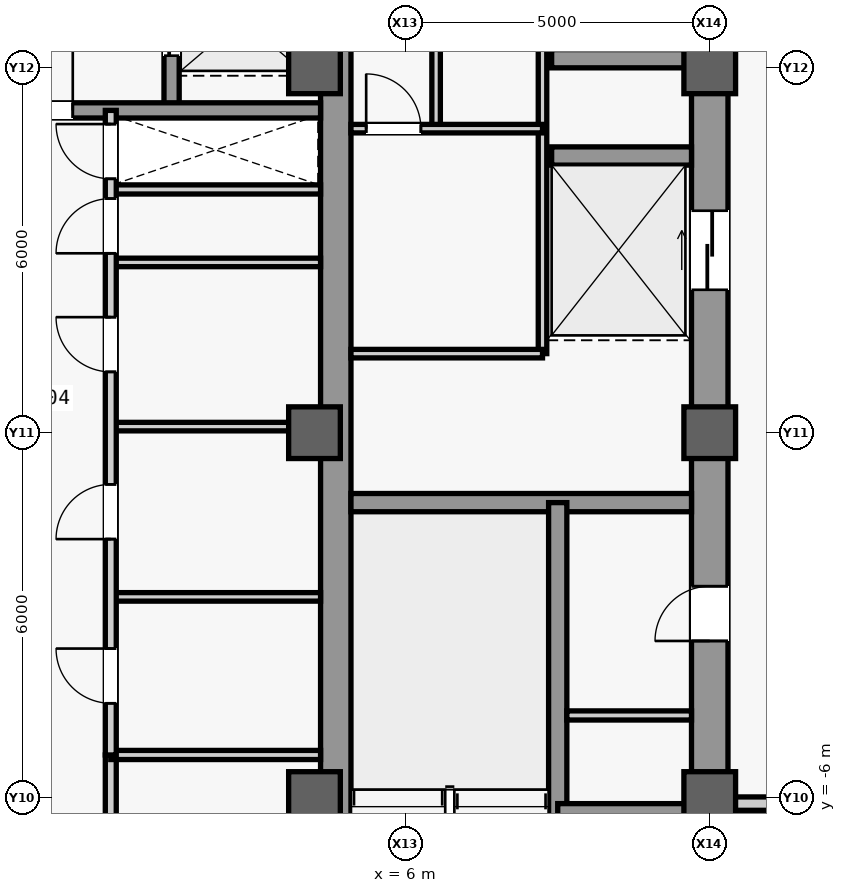
"""IFC4 building model, lengths in metres.
Left out: names, types, materials, properties, quantities, classifications, styles, units other than length and angle.
Written with IfcOpenShell. Run it as: python <this file> out.ifc"""

import sys

from ifc_helpers import new_model, si_unit, direction, frame, frame_2d, origin, origin_2d, place, context, subcontext, project, spatial, rectangle, extrude, source, transform, mapped, element, fill, save


model = new_model("IFC4")
c1 = context("Model", 3, precision=1e-05, world=origin(), true_north=direction((0.0, 1.0)))
c2 = subcontext(c1, "Body", "Model", "MODEL_VIEW")
j1 = project(units=[si_unit("LENGTHUNIT", "METRE"), si_unit("PLANEANGLEUNIT", "RADIAN")], contexts=[c1])
p1 = place(None, origin())
s1 = spatial("IfcSite", under=j1, at=p1, CompositionType="ELEMENT")
p2 = place(p1, origin())
s2 = spatial("IfcBuilding", under=s1, at=p2, CompositionType="ELEMENT")
p3 = place(p2, frame((0.0, 0.0, 207.1)))
s3 = spatial("IfcBuildingStorey", under=s2, at=p3, CompositionType="ELEMENT", Elevation=207.1)
m1 = source(origin(), c2, "Body", "SweptSolid", [
    extrude(rectangle(XDim=22.0, YDim=0.6, at=frame_2d((11.0, 0.0))), origin(), (0.0, 0.0, 1.0), 3.78),
])
p4 = place(p3, frame((11.0, -11.0, 0.0), z_axis=(0.0, 0.0, 1.0), x_axis=(0.0, 1.0, 0.0)))
e1 = element("IfcWall", 1, at=p4, inside=s3, PredefinedType="SHEAR", context=c2, shape_type="MappedRepresentation", body=[
    mapped(m1, transform((0.0, 0.0, 0.0), scale=1.0)),
])
m2 = source(origin(), c2, "Body", "SweptSolid", [
    extrude(rectangle(XDim=1.1, YDim=2.2, at=frame_2d((0.55, 1.1))), frame((0.0, 0.31, 0.0), z_axis=(0.0, -1.0, 0.0), x_axis=(1.0, 0.0, 0.0)), (0.0, 0.0, 1.0), 0.62),
])
p5 = place(p4, frame((0.8, 0.0, 0.0)))
e2 = element("IfcOpeningElement", 2, at=p5, cuts=e1, PredefinedType="OPENING", context=c2, shape_type="MappedRepresentation", body=[
    mapped(m2, transform((0.0, 0.0, 0.0), scale=1.0)),
])
m3 = source(origin(), c2, "Body", "SweptSolid", [
    extrude(rectangle(XDim=0.9, YDim=2.15, at=frame_2d((0.45, 1.075))), frame((0.0, 0.31, 0.0), z_axis=(0.0, -1.0, 0.0), x_axis=(1.0, 0.0, 0.0)), (0.0, 0.0, 1.0), 0.62),
])
p6 = place(p4, frame((7.575, 0.0, 0.0)))
e3 = element("IfcOpeningElement", 3, at=p6, cuts=e1, PredefinedType="OPENING", context=c2, shape_type="MappedRepresentation", body=[
    mapped(m3, transform((0.0, 0.0, 0.0), scale=1.0)),
])
m4 = source(origin(), c2, "Body", "SweptSolid", [
    extrude(rectangle(XDim=1.3, YDim=2.3, at=frame_2d((0.65, 1.15))), frame((0.0, 0.31, 0.0), z_axis=(0.0, -1.0, 0.0), x_axis=(1.0, 0.0, 0.0)), (0.0, 0.0, 1.0), 0.62),
])
p7 = place(p4, frame((2.7, 0.0, 0.0)))
e4 = element("IfcOpeningElement", 4, at=p7, cuts=e1, PredefinedType="OPENING", context=c2, shape_type="MappedRepresentation", body=[
    mapped(m4, transform((0.0, 0.0, 0.0), scale=1.0)),
])
p8 = place(p4, frame((13.35, 0.0, 0.0)))
e5 = element("IfcOpeningElement", 5, at=p8, cuts=e1, PredefinedType="OPENING", context=c2, shape_type="MappedRepresentation", body=[
    mapped(m4, transform((0.0, 0.0, 0.0), scale=1.0)),
])
m5 = source(origin(), c2, "Body", "SweptSolid", [
    extrude(rectangle(XDim=21.4, YDim=0.5, at=frame_2d((10.7, 0.0))), origin(), (0.0, 0.0, 1.0), 3.78),
])
p9 = place(p3, frame((4.85, -10.7, 0.0), z_axis=(0.0, 0.0, 1.0), x_axis=(0.0, 1.0, 0.0)))
e6 = element("IfcWall", 6, at=p9, inside=s3, PredefinedType="SHEAR", context=c2, shape_type="MappedRepresentation", body=[
    mapped(m5, transform((0.0, 0.0, 0.0), scale=1.0)),
])
m6 = source(origin(), c2, "Body", "SweptSolid", [
    extrude(rectangle(XDim=5.6, YDim=0.3, at=frame_2d((2.8, 0.0))), origin(), (0.0, 0.0, 1.0), 3.78),
])
p10 = place(p3, frame((5.1, -1.15, 0.0), z_axis=(0.0, 0.0, 1.0), x_axis=(1.0, 0.0, 0.0)))
e7 = element("IfcWall", 7, at=p10, inside=s3, PredefinedType="SHEAR", context=c2, shape_type="MappedRepresentation", body=[
    mapped(m6, transform((0.0, 0.0, 0.0), scale=1.0)),
])
m7 = source(origin(), c2, "Body", "SweptSolid", [
    extrude(rectangle(XDim=0.85, YDim=0.85, at=origin_2d()), origin(), (0.0, 0.0, 1.0), 4.0),
])
for number, where, z_axis, x_axis in (
    (8, (4.5, -6.0, 0.0), (0.0, 0.0, 1.0), (1.0, 0.0, 0.0)),
    (9, (4.5, 0.0, 0.0), (0.0, 0.0, 1.0), (1.0, 0.0, 0.0)),
    (10, (4.5, 6.0, 0.0), (0.0, 0.0, 1.0), (1.0, 0.0, 0.0)),
    (11, (11.0, -6.0, 0.0), (0.0, 0.0, 1.0), (1.0, 0.0, 0.0)),
    (12, (11.0, 0.0, 0.0), (0.0, 0.0, 1.0), (1.0, 0.0, 0.0)),
    (13, (11.0, 6.0, 0.0), (0.0, 0.0, 1.0), (1.0, 0.0, 0.0)),
):
    element("IfcColumn", number, at=place(p3, frame(where, z_axis=z_axis, x_axis=x_axis)), inside=s3, PredefinedType="COLUMN", context=c2, shape_type="MappedRepresentation", body=[
        mapped(m7, transform((0.0, 0.0, 0.0), scale=1.0)),
    ])
m8 = source(origin(), c2, "Body", "SweptSolid", [
    extrude(rectangle(XDim=7.8, YDim=0.3, at=frame_2d((3.9, 0.0))), origin(), (0.0, 0.0, 1.0), 3.78),
])
p11 = place(p3, frame((8.5, -8.95, 0.0), z_axis=(0.0, 0.0, 1.0), x_axis=(0.0, 1.0, 0.0)))
e14 = element("IfcWall", 14, at=p11, inside=s3, PredefinedType="SHEAR", context=c2, shape_type="MappedRepresentation", body=[
    mapped(m8, transform((0.0, 0.0, 0.0), scale=1.0)),
])
m9 = source(origin(), c2, "Body", "SweptSolid", [
    extrude(rectangle(XDim=2.2, YDim=0.3, at=frame_2d((1.1, 0.0))), origin(), (0.0, 0.0, 1.0), 3.78),
])
p12 = place(p3, frame((8.5, -6.25, 0.0), z_axis=(0.0, 0.0, 1.0), x_axis=(1.0, 0.0, 0.0)))
e15 = element("IfcWall", 15, at=p12, inside=s3, PredefinedType="SHEAR", context=c2, shape_type="MappedRepresentation", body=[
    mapped(m9, transform((0.0, 0.0, 0.0), scale=1.0)),
])
m10 = source(origin(), c2, "Body", "SweptSolid", [
    extrude(rectangle(XDim=2.3, YDim=0.3, at=frame_2d((1.15, 0.0))), origin(), (0.0, 0.0, 1.0), 3.78),
])
for number, where, z_axis, x_axis in (
    (16, (8.4, 4.55, 0.0), (0.0, 0.0, 1.0), (1.0, 0.0, 0.0)),
    (17, (8.4, 6.15, 0.0), (0.0, 0.0, 1.0), (1.0, 0.0, 0.0)),
):
    element("IfcWall", number, at=place(p3, frame(where, z_axis=z_axis, x_axis=x_axis)), inside=s3, PredefinedType="SHEAR", context=c2, shape_type="MappedRepresentation", body=[
        mapped(m10, transform((0.0, 0.0, 0.0), scale=1.0)),
    ])
m11 = source(origin(), c2, "Body", "SweptSolid", [
    extrude(rectangle(XDim=2.05, YDim=0.15, at=frame_2d((1.025, 0.0))), origin(), (0.0, 0.0, 1.0), 3.78),
])
p13 = place(p3, frame((8.65, -4.65, 0.0), z_axis=(0.0, 0.0, 1.0), x_axis=(1.0, 0.0, 0.0)))
e18 = element("IfcWall", 18, at=p13, inside=s3, PredefinedType="PARTITIONING", context=c2, shape_type="MappedRepresentation", body=[
    mapped(m11, transform((0.0, 0.0, 0.0), scale=1.0)),
])
m12 = source(origin(), c2, "Body", "SweptSolid", [
    extrude(rectangle(XDim=9.4, YDim=0.14, at=frame_2d((4.7, 0.0))), origin(), (0.0, 0.0, 1.0), 3.78),
])
p14 = place(p3, frame((8.25, 1.3, 0.0), z_axis=(0.0, 0.0, 1.0), x_axis=(0.0, 1.0, 0.0)))
e19 = element("IfcWall", 19, at=p14, inside=s3, PredefinedType="PARTITIONING", context=c2, shape_type="MappedRepresentation", body=[
    mapped(m12, transform((0.0, 0.0, 0.0), scale=1.0)),
])
m13 = source(origin(), c2, "Body", "SweptSolid", [
    extrude(rectangle(XDim=3.15, YDim=0.14, at=frame_2d((1.575, 0.0))), origin(), (0.0, 0.0, 1.0), 3.78),
])
p15 = place(p3, frame((5.1, 1.3, 0.0), z_axis=(0.0, 0.0, 1.0), x_axis=(1.0, 0.0, 0.0)))
e20 = element("IfcWall", 20, at=p15, inside=s3, PredefinedType="PARTITIONING", context=c2, shape_type="MappedRepresentation", body=[
    mapped(m13, transform((0.0, 0.0, 0.0), scale=1.0)),
])
m14 = source(origin(), c2, "Body", "SweptSolid", [
    extrude(rectangle(XDim=5.7, YDim=0.14, at=frame_2d((2.85, 0.0))), origin(), (0.0, 0.0, 1.0), 3.78),
])
p16 = place(p3, frame((6.5, 5.0, 0.0), z_axis=(0.0, 0.0, 1.0), x_axis=(0.0, 1.0, 0.0)))
e21 = element("IfcWall", 21, at=p16, inside=s3, PredefinedType="PARTITIONING", context=c2, shape_type="MappedRepresentation", body=[
    mapped(m14, transform((0.0, 0.0, 0.0), scale=1.0)),
])
m15 = source(origin(), c2, "Body", "SweptSolid", [
    extrude(rectangle(XDim=0.9, YDim=2.15, at=frame_2d((0.45, 1.075))), frame((0.0, 0.08, 0.0), z_axis=(0.0, -1.0, 0.0), x_axis=(1.0, 0.0, 0.0)), (0.0, 0.0, 1.0), 0.16),
])
p17 = place(p16, frame((2.05, 0.0, 0.0)))
e22 = element("IfcOpeningElement", 22, at=p17, cuts=e21, PredefinedType="OPENING", context=c2, shape_type="MappedRepresentation", body=[
    mapped(m15, transform((0.0, 0.0, 0.0), scale=1.0)),
])
p18 = place(p3, frame((5.1, 5.0, 0.0), z_axis=(0.0, 0.0, 1.0), x_axis=(1.0, 0.0, 0.0)))
e23 = element("IfcWall", 23, at=p18, inside=s3, PredefinedType="PARTITIONING", context=c2, shape_type="MappedRepresentation", body=[
    mapped(m13, transform((0.0, 0.0, 0.0), scale=1.0)),
])
p19 = place(p18, frame((0.25, 0.0, 0.0)))
e24 = element("IfcOpeningElement", 24, at=p19, cuts=e23, PredefinedType="OPENING", context=c2, shape_type="MappedRepresentation", body=[
    mapped(m15, transform((0.0, 0.0, 0.0), scale=1.0)),
])
m16 = source(origin(), c2, "Body", "SweptSolid", [
    extrude(rectangle(XDim=4.05, YDim=0.22, at=frame_2d((2.025, 0.0))), origin(), (0.0, 0.0, 1.0), 2.38),
])
p20 = place(p3, frame((11.3, -6.1, 0.0), z_axis=(0.0, 0.0, 1.0), x_axis=(1.0, 0.0, 0.0)))
e25 = element("IfcWall", 25, at=p20, inside=s3, PredefinedType="PARTITIONING", context=c2, shape_type="MappedRepresentation", body=[
    mapped(m16, transform((0.0, 0.0, 0.0), scale=1.0)),
])
m17 = source(origin(), c2, "Body", "SweptSolid", [
    extrude(rectangle(XDim=3.45, YDim=0.15, at=frame_2d((1.725, 0.0))), origin(), (0.0, 0.0, 1.0), 3.78),
])
p21 = place(p3, frame((1.15, 4.0, 0.0), z_axis=(0.0, 0.0, 1.0), x_axis=(1.0, 0.0, 0.0)))
e26 = element("IfcWall", 26, at=p21, inside=s3, PredefinedType="PARTITIONING", context=c2, shape_type="MappedRepresentation", body=[
    mapped(m17, transform((0.0, 0.0, 0.0), scale=1.0)),
])
m18 = source(origin(), c2, "Body", "SweptSolid", [
    extrude(rectangle(XDim=5.4, YDim=0.18, at=frame_2d((2.7, 0.0))), origin(), (0.0, 0.0, 1.0), 3.78),
])
p22 = place(p3, frame((1.15, -10.7, 0.0), z_axis=(0.0, 0.0, 1.0), x_axis=(0.0, 1.0, 0.0)))
e27 = element("IfcWall", 27, at=p22, inside=s3, PredefinedType="PARTITIONING", context=c2, shape_type="MappedRepresentation", body=[
    mapped(m18, transform((0.0, 0.0, 0.0), scale=1.0)),
])
m19 = source(origin(), c2, "Body", "SweptSolid", [
    extrude(rectangle(XDim=0.9, YDim=2.15, at=frame_2d((0.45, 1.075))), frame((0.0, 0.1, 0.0), z_axis=(0.0, -1.0, 0.0), x_axis=(1.0, 0.0, 0.0)), (0.0, 0.0, 1.0), 0.2),
])
p23 = place(p22, frame((2.25, 0.0, 0.0)))
e28 = element("IfcOpeningElement", 28, at=p23, cuts=e27, PredefinedType="OPENING", context=c2, shape_type="MappedRepresentation", body=[
    mapped(m19, transform((0.0, 0.0, 0.0), scale=1.0)),
])
p24 = place(p3, frame((1.15, -5.3, 0.0), z_axis=(0.0, 0.0, 1.0), x_axis=(1.0, 0.0, 0.0)))
e29 = element("IfcWall", 29, at=p24, inside=s3, PredefinedType="PARTITIONING", context=c2, shape_type="MappedRepresentation", body=[
    mapped(m17, transform((0.0, 0.0, 0.0), scale=1.0)),
])
m20 = source(origin(), c2, "Body", "SweptSolid", [
    extrude(rectangle(XDim=5.4, YDim=0.25, at=frame_2d((2.7, 0.0))), origin(), (0.0, 0.0, 1.0), 3.78),
])
p25 = place(p3, frame((2.15, 5.3, 0.0), z_axis=(0.0, 0.0, 1.0), x_axis=(0.0, 1.0, 0.0)))
e30 = element("IfcWall", 30, at=p25, inside=s3, PredefinedType="SHEAR", context=c2, shape_type="MappedRepresentation", body=[
    mapped(m20, transform((0.0, 0.0, 0.0), scale=1.0)),
])
m21 = source(origin(), c2, "Body", "SweptSolid", [
    extrude(rectangle(XDim=1.2, YDim=2.3, at=frame_2d((0.6, 1.15))), frame((0.0, 0.135, 0.0), z_axis=(0.0, -1.0, 0.0), x_axis=(1.0, 0.0, 0.0)), (0.0, 0.0, 1.0), 0.27),
])
p26 = place(p25, frame((3.3, 0.0, 0.0)))
e31 = element("IfcOpeningElement", 31, at=p26, cuts=e30, PredefinedType="OPENING", context=c2, shape_type="MappedRepresentation", body=[
    mapped(m21, transform((0.0, 0.0, 0.0), scale=1.0)),
])
p27 = place(p25, frame((0.9, 0.0, 0.0)))
e32 = element("IfcOpeningElement", 32, at=p27, cuts=e30, PredefinedType="OPENING", context=c2, shape_type="MappedRepresentation", body=[
    mapped(m21, transform((0.0, 0.0, 0.0), scale=1.0)),
])
m22 = source(origin(), c2, "Body", "SweptSolid", [
    extrude(rectangle(XDim=9.2, YDim=0.25, at=frame_2d((4.6, 0.0))), origin(), (0.0, 0.0, 1.0), 3.78),
])
p28 = place(p3, frame((-4.6, 5.3, 0.0), z_axis=(0.0, 0.0, 1.0), x_axis=(1.0, 0.0, 0.0)))
e33 = element("IfcWall", 33, at=p28, inside=s3, PredefinedType="SHEAR", context=c2, shape_type="MappedRepresentation", body=[
    mapped(m22, transform((0.0, 0.0, 0.0), scale=1.0)),
])
m23 = source(origin(), c2, "Body", "SweptSolid", [
    extrude(rectangle(XDim=1.05, YDim=2.2, at=frame_2d((0.525, 1.1))), frame((0.0, 0.135, 0.0), z_axis=(0.0, -1.0, 0.0), x_axis=(1.0, 0.0, 0.0)), (0.0, 0.0, 1.0), 0.27),
])
p29 = place(p28, frame((4.075, 0.0, 0.0)))
e34 = element("IfcOpeningElement", 34, at=p29, cuts=e33, PredefinedType="OPENING", context=c2, shape_type="MappedRepresentation", body=[
    mapped(m23, transform((0.0, 0.0, 0.0), scale=1.0)),
])
m24 = source(origin(), c2, "Body", "SweptSolid", [
    extrude(rectangle(XDim=3.45, YDim=0.14, at=frame_2d((1.725, 0.0))), origin(), (0.0, 0.0, 1.0), 3.78),
])
p30 = place(p3, frame((1.15, -2.7, 0.0), z_axis=(0.0, 0.0, 1.0), x_axis=(1.0, 0.0, 0.0)))
e35 = element("IfcWall", 35, at=p30, inside=s3, PredefinedType="PARTITIONING", context=c2, shape_type="MappedRepresentation", body=[
    mapped(m24, transform((0.0, 0.0, 0.0), scale=1.0)),
])
m25 = source(origin(), c2, "Body", "SweptSolid", [
    extrude(rectangle(XDim=3.45, YDim=0.14, at=frame_2d((1.725, 0.0))), origin(), (0.0, 0.0, 1.0), 3.085),
])
p31 = place(p3, frame((1.15, 0.1, 0.0), z_axis=(0.0, 0.0, 1.0), x_axis=(1.0, 0.0, 0.0)))
e36 = element("IfcWall", 36, at=p31, inside=s3, PredefinedType="PARTITIONING", context=c2, shape_type="MappedRepresentation", body=[
    mapped(m25, transform((0.0, 0.0, 0.0), scale=1.0)),
])
p32 = place(p3, frame((1.15, 2.8, 0.0), z_axis=(0.0, 0.0, 1.0), x_axis=(1.0, 0.0, 0.0)))
e37 = element("IfcWall", 37, at=p32, inside=s3, PredefinedType="PARTITIONING", context=c2, shape_type="MappedRepresentation", body=[
    mapped(m24, transform((0.0, 0.0, 0.0), scale=1.0)),
])
m26 = source(origin(), c2, "Body", "SweptSolid", [
    extrude(rectangle(XDim=10.6, YDim=0.18, at=frame_2d((5.3, 0.0))), origin(), (0.0, 0.0, 1.0), 3.78),
])
p33 = place(p3, frame((1.15, -5.3, 0.0), z_axis=(0.0, 0.0, 1.0), x_axis=(0.0, 1.0, 0.0)))
e38 = element("IfcWall", 38, at=p33, inside=s3, PredefinedType="PARTITIONING", context=c2, shape_type="MappedRepresentation", body=[
    mapped(m26, transform((0.0, 0.0, 0.0), scale=1.0)),
])
p34 = place(p33, frame((0.85, 0.0, 0.0)))
e39 = element("IfcOpeningElement", 39, at=p34, cuts=e38, PredefinedType="OPENING", context=c2, shape_type="MappedRepresentation", body=[
    mapped(m19, transform((0.0, 0.0, 0.0), scale=1.0)),
])
p35 = place(p33, frame((3.55, 0.0, 0.0)))
e40 = element("IfcOpeningElement", 40, at=p35, cuts=e38, PredefinedType="OPENING", context=c2, shape_type="MappedRepresentation", body=[
    mapped(m19, transform((0.0, 0.0, 0.0), scale=1.0)),
])
p36 = place(p33, frame((6.3, 0.0, 0.0)))
e41 = element("IfcOpeningElement", 41, at=p36, cuts=e38, PredefinedType="OPENING", context=c2, shape_type="MappedRepresentation", body=[
    mapped(m19, transform((0.0, 0.0, 0.0), scale=1.0)),
])
p37 = place(p33, frame((8.25, 0.0, 0.0)))
e42 = element("IfcOpeningElement", 42, at=p37, cuts=e38, PredefinedType="OPENING", context=c2, shape_type="MappedRepresentation", body=[
    mapped(m19, transform((0.0, 0.0, 0.0), scale=1.0)),
])
p38 = place(p33, frame((9.475, 0.0, 0.0)))
e43 = element("IfcOpeningElement", 43, at=p38, cuts=e38, PredefinedType="OPENING", context=c2, shape_type="MappedRepresentation", body=[
    mapped(m19, transform((0.0, 0.0, 0.0), scale=1.0)),
])
m27 = source(origin(), c2, "Body", "SweptSolid", [
    extrude(rectangle(XDim=0.9, YDim=2.15, at=frame_2d((0.45, 1.075))), frame((0.0, 0.025, 0.0), z_axis=(0.0, -1.0, 0.0), x_axis=(1.0, 0.0, 0.0)), (0.0, 0.0, 1.0), 0.05),
])
p39 = place(p6, origin())
e44 = element("IfcDoor", 44, at=p39, inside=s3, OperationType="SINGLE_SWING_LEFT", PredefinedType="DOOR", context=c2, shape_type="MappedRepresentation", body=[
    mapped(m27, transform((0.0, 0.0, 0.0), scale=1.0)),
])
fill(e3, e44)
p40 = place(p19, origin())
e45 = element("IfcDoor", 45, at=p40, inside=s3, OperationType="SINGLE_SWING_LEFT", PredefinedType="DOOR", context=c2, shape_type="MappedRepresentation", body=[
    mapped(m27, transform((0.0, 0.0, 0.0), scale=1.0)),
])
fill(e24, e45)
m28 = source(origin(), c2, "Body", "SweptSolid", [
    extrude(rectangle(XDim=1.05, YDim=2.2, at=frame_2d((0.525, 1.1))), frame((0.0, 0.025, 0.0), z_axis=(0.0, -1.0, 0.0), x_axis=(1.0, 0.0, 0.0)), (0.0, 0.0, 1.0), 0.05),
])
p41 = place(p29, origin())
e46 = element("IfcDoor", 46, at=p41, inside=s3, OperationType="SINGLE_SWING_RIGHT", PredefinedType="DOOR", context=c2, shape_type="MappedRepresentation", body=[
    mapped(m28, transform((0.0, 0.0, 0.0), scale=1.0)),
])
fill(e34, e46)
p42 = place(p34, origin())
e47 = element("IfcDoor", 47, at=p42, inside=s3, OperationType="SINGLE_SWING_RIGHT", PredefinedType="DOOR", context=c2, shape_type="MappedRepresentation", body=[
    mapped(m27, transform((0.0, 0.0, 0.0), scale=1.0)),
])
fill(e39, e47)
p43 = place(p35, origin())
e48 = element("IfcDoor", 48, at=p43, inside=s3, OperationType="SINGLE_SWING_LEFT", PredefinedType="DOOR", context=c2, shape_type="MappedRepresentation", body=[
    mapped(m27, transform((0.0, 0.0, 0.0), scale=1.0)),
])
fill(e40, e48)
p44 = place(p36, origin())
e49 = element("IfcDoor", 49, at=p44, inside=s3, OperationType="SINGLE_SWING_RIGHT", PredefinedType="DOOR", context=c2, shape_type="MappedRepresentation", body=[
    mapped(m27, transform((0.0, 0.0, 0.0), scale=1.0)),
])
fill(e41, e49)
p45 = place(p37, origin())
e50 = element("IfcDoor", 50, at=p45, inside=s3, OperationType="SINGLE_SWING_LEFT", PredefinedType="DOOR", context=c2, shape_type="MappedRepresentation", body=[
    mapped(m27, transform((0.0, 0.0, 0.0), scale=1.0)),
])
fill(e42, e50)
p46 = place(p38, origin())
e51 = element("IfcDoor", 51, at=p46, inside=s3, OperationType="SINGLE_SWING_RIGHT", PredefinedType="DOOR", context=c2, shape_type="MappedRepresentation", body=[
    mapped(m27, transform((0.0, 0.0, 0.0), scale=1.0)),
])
fill(e43, e51)
m29 = source(origin(), c2, "Body", "SweptSolid", [
    extrude(rectangle(XDim=1.2, YDim=2.3, at=frame_2d((0.6, 1.15))), frame((0.0, 0.025, 0.0), z_axis=(0.0, -1.0, 0.0), x_axis=(1.0, 0.0, 0.0)), (0.0, 0.0, 1.0), 0.05),
])
p47 = place(p27, origin())
e52 = element("IfcDoor", 52, at=p47, inside=s3, OperationType="SLIDING_TO_LEFT", PredefinedType="DOOR", context=c2, shape_type="MappedRepresentation", body=[
    mapped(m29, transform((0.0, 0.0, 0.0), scale=1.0)),
])
fill(e32, e52)
m30 = source(origin(), c2, "Body", "SweptSolid", [
    extrude(rectangle(XDim=1.3, YDim=2.3, at=frame_2d((0.65, 1.15))), frame((0.0, 0.025, 0.0), z_axis=(0.0, -1.0, 0.0), x_axis=(1.0, 0.0, 0.0)), (0.0, 0.0, 1.0), 0.05),
])
p48 = place(p8, origin())
e53 = element("IfcDoor", 53, at=p48, inside=s3, OperationType="SLIDING_TO_LEFT", PredefinedType="DOOR", context=c2, shape_type="MappedRepresentation", body=[
    mapped(m30, transform((0.0, 0.0, 0.0), scale=1.0)),
])
fill(e5, e53)
save(model, sys.argv[1])
